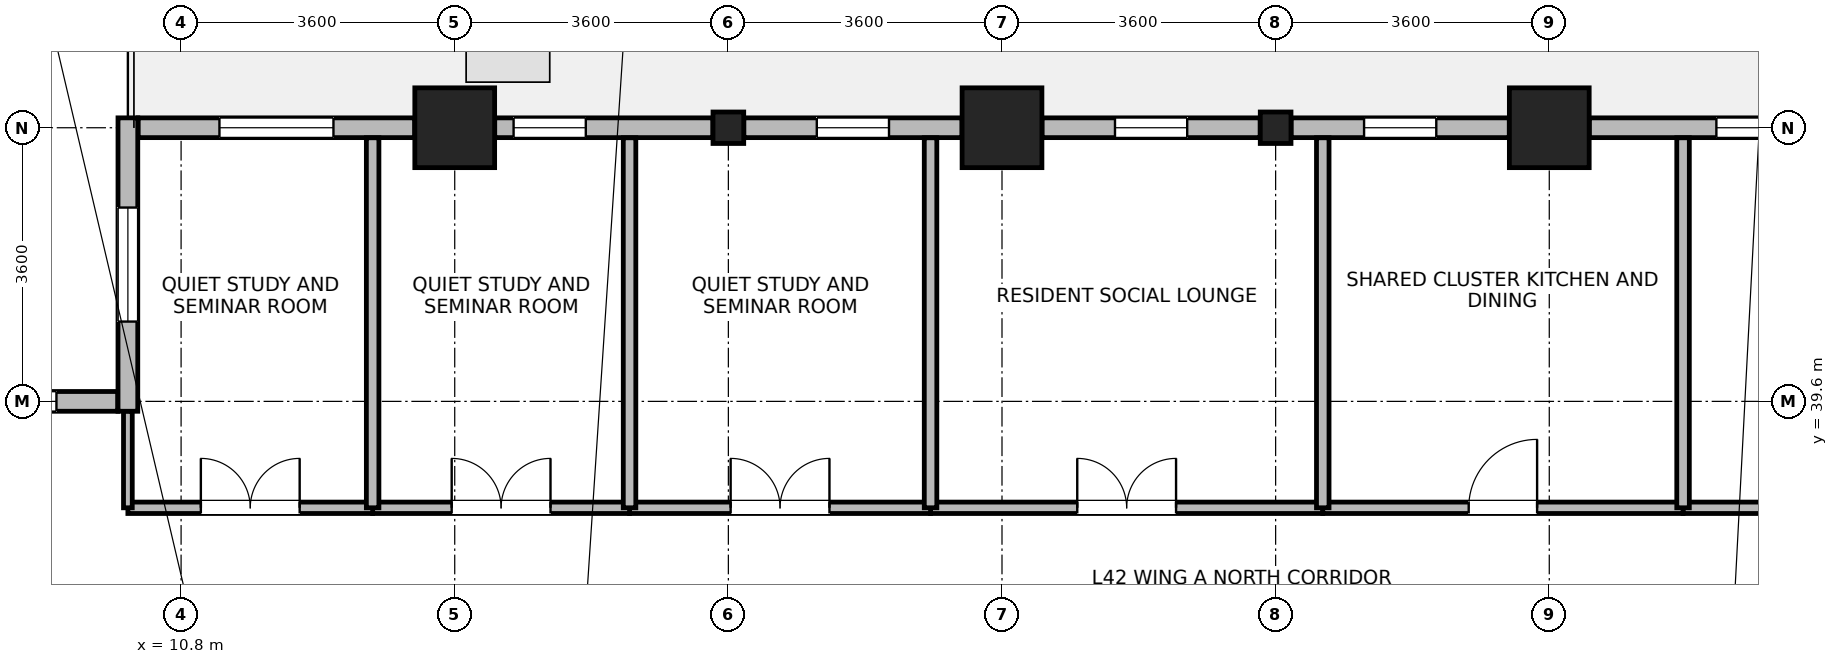
"""IFC4 building model, lengths in metres.
Left out: names, types, materials, properties, quantities, classifications, styles, units other than length and angle.
Written with IfcOpenShell. Run it as: python <this file> out.ifc"""

import sys

from ifc_helpers import new_model, si_unit, direction, frame, frame_2d, origin, origin_2d, place, context, subcontext, project, spatial, rectangle, i_section, extrude, source, transform, mapped, element, fill, save


model = new_model("IFC4")
c1 = context("Model", 3, precision=1e-05, world=origin(), true_north=direction((0.0, 1.0)))
c2 = subcontext(c1, "Body", "Model", "MODEL_VIEW")
j1 = project(units=[si_unit("LENGTHUNIT", "METRE"), si_unit("PLANEANGLEUNIT", "RADIAN")], contexts=[c1])
p1 = place(None, origin())
s1 = spatial("IfcSite", under=j1, at=p1, CompositionType="ELEMENT")
p2 = place(p1, origin())
s2 = spatial("IfcBuilding", under=s1, at=p2, CompositionType="ELEMENT")
p3 = place(p2, frame((0.0, 0.0, 166.1)))
s3 = spatial("IfcBuildingStorey", under=s2, at=p3, CompositionType="ELEMENT", Elevation=166.1)
m1 = source(origin(), c2, "Body", "SweptSolid", [
    extrude(rectangle(XDim=1.05, YDim=1.05, at=origin_2d()), origin(), (0.0, 0.0, 1.0), 3.7),
])
for number, where, z_axis, x_axis in (
    (1, (14.4, 43.2, 0.0), (0.0, 0.0, 1.0), (1.0, 0.0, 0.0)),
    (2, (21.6, 43.2, 0.0), (0.0, 0.0, 1.0), (1.0, 0.0, 0.0)),
    (3, (28.8, 43.2, 0.0), (0.0, 0.0, 1.0), (1.0, 0.0, 0.0)),
):
    element("IfcColumn", number, at=place(p3, frame(where, z_axis=z_axis, x_axis=x_axis)), inside=s3, PredefinedType="COLUMN", context=c2, shape_type="MappedRepresentation", body=[
        mapped(m1, transform((0.0, 0.0, 0.0), x_axis=(1.0, 0.0, 0.0), y_axis=(0.0, 1.0, 0.0), z_axis=(0.0, 0.0, 1.0), scale=1.0)),
    ])
m2 = source(origin(), c2, "Body", "SweptSolid", [
    extrude(i_section(OverallWidth=0.404, OverallDepth=0.414, WebThickness=0.021, FlangeThickness=0.028, FilletRadius=0.015, at=origin_2d()), origin(), (0.0, 0.0, 1.0), 3.7),
])
for number, where, z_axis, x_axis in (
    (4, (18.0, 43.2, 0.0), (0.0, 0.0, 1.0), (1.0, 0.0, 0.0)),
    (5, (25.2, 43.2, 0.0), (0.0, 0.0, 1.0), (1.0, 0.0, 0.0)),
):
    element("IfcColumn", number, at=place(p3, frame(where, z_axis=z_axis, x_axis=x_axis)), inside=s3, PredefinedType="COLUMN", context=c2, shape_type="MappedRepresentation", body=[
        mapped(m2, transform((0.0, 0.0, 0.0), x_axis=(1.0, 0.0, 0.0), y_axis=(0.0, 1.0, 0.0), z_axis=(0.0, 0.0, 1.0), scale=1.0)),
    ])
p4 = place(p3, frame((29.326, 43.2, 0.0), z_axis=(0.0, 0.0, 1.0), x_axis=(1.0, 0.0, 0.0)))
e6 = element("IfcWall", 6, at=p4, inside=s3, PredefinedType="STANDARD", context=c2, shape_type="SweptSolid", body=[
    extrude(rectangle(XDim=2.871, YDim=0.26, at=frame_2d((1.436, 0.0))), origin(), (0.0, 0.0, 1.0), 2.99),
])
p5 = place(p4, frame((1.673, 0.0, 0.85)))
e7 = element("IfcOpeningElement", 7, at=p5, cuts=e6, PredefinedType="OPENING", context=c2, shape_type="SweptSolid", body=[
    extrude(rectangle(XDim=0.95, YDim=1.75, at=frame_2d((0.475, 0.875))), frame((0.0, 0.14, 0.0), z_axis=(0.0, -1.0, 0.0), x_axis=(1.0, 0.0, 0.0)), (0.0, 0.0, 1.0), 0.28),
])
p6 = place(p3, frame((25.403, 43.2, 0.0), z_axis=(0.0, 0.0, 1.0), x_axis=(1.0, 0.0, 0.0)))
e8 = element("IfcWall", 8, at=p6, inside=s3, PredefinedType="STANDARD", context=c2, shape_type="SweptSolid", body=[
    extrude(rectangle(XDim=2.871, YDim=0.26, at=frame_2d((1.436, 0.0))), origin(), (0.0, 0.0, 1.0), 2.99),
])
p7 = place(p6, frame((0.96, 0.0, 0.85)))
e9 = element("IfcOpeningElement", 9, at=p7, cuts=e8, PredefinedType="OPENING", context=c2, shape_type="SweptSolid", body=[
    extrude(rectangle(XDim=0.95, YDim=1.75, at=frame_2d((0.475, 0.875))), frame((0.0, 0.14, 0.0), z_axis=(0.0, -1.0, 0.0), x_axis=(1.0, 0.0, 0.0)), (0.0, 0.0, 1.0), 0.28),
])
p8 = place(p3, frame((22.126, 43.2, 0.0), z_axis=(0.0, 0.0, 1.0), x_axis=(1.0, 0.0, 0.0)))
e10 = element("IfcWall", 10, at=p8, inside=s3, PredefinedType="STANDARD", context=c2, shape_type="SweptSolid", body=[
    extrude(rectangle(XDim=2.871, YDim=0.26, at=frame_2d((1.436, 0.0))), origin(), (0.0, 0.0, 1.0), 2.99),
])
p9 = place(p8, frame((0.96, 0.0, 0.85)))
e11 = element("IfcOpeningElement", 11, at=p9, cuts=e10, PredefinedType="OPENING", context=c2, shape_type="SweptSolid", body=[
    extrude(rectangle(XDim=0.95, YDim=1.75, at=frame_2d((0.475, 0.875))), frame((0.0, 0.14, 0.0), z_axis=(0.0, -1.0, 0.0), x_axis=(1.0, 0.0, 0.0)), (0.0, 0.0, 1.0), 0.28),
])
p10 = place(p3, frame((18.203, 43.2, 0.0), z_axis=(0.0, 0.0, 1.0), x_axis=(1.0, 0.0, 0.0)))
e12 = element("IfcWall", 12, at=p10, inside=s3, PredefinedType="STANDARD", context=c2, shape_type="SweptSolid", body=[
    extrude(rectangle(XDim=2.871, YDim=0.26, at=frame_2d((1.436, 0.0))), origin(), (0.0, 0.0, 1.0), 2.99),
])
p11 = place(p10, frame((0.96, 0.0, 0.85)))
e13 = element("IfcOpeningElement", 13, at=p11, cuts=e12, PredefinedType="OPENING", context=c2, shape_type="SweptSolid", body=[
    extrude(rectangle(XDim=0.95, YDim=1.75, at=frame_2d((0.475, 0.875))), frame((0.0, 0.14, 0.0), z_axis=(0.0, -1.0, 0.0), x_axis=(1.0, 0.0, 0.0)), (0.0, 0.0, 1.0), 0.28),
])
p12 = place(p3, frame((14.926, 43.2, 0.0), z_axis=(0.0, 0.0, 1.0), x_axis=(1.0, 0.0, 0.0)))
e14 = element("IfcWall", 14, at=p12, inside=s3, PredefinedType="STANDARD", context=c2, shape_type="SweptSolid", body=[
    extrude(rectangle(XDim=2.871, YDim=0.26, at=frame_2d((1.436, 0.0))), origin(), (0.0, 0.0, 1.0), 2.99),
])
p13 = place(p12, frame((0.249, 0.0, 0.85)))
e15 = element("IfcOpeningElement", 15, at=p13, cuts=e14, PredefinedType="OPENING", context=c2, shape_type="SweptSolid", body=[
    extrude(rectangle(XDim=0.95, YDim=1.75, at=frame_2d((0.475, 0.875))), frame((0.0, 0.14, 0.0), z_axis=(0.0, -1.0, 0.0), x_axis=(1.0, 0.0, 0.0)), (0.0, 0.0, 1.0), 0.28),
])
p14 = place(p3, frame((10.235, 43.2, 0.0), z_axis=(0.0, 0.0, 1.0), x_axis=(1.0, 0.0, 0.0)))
e16 = element("IfcWall", 16, at=p14, inside=s3, PredefinedType="STANDARD", context=c2, shape_type="SweptSolid", body=[
    extrude(rectangle(XDim=3.639, YDim=0.26, at=frame_2d((1.819, 0.0))), origin(), (0.0, 0.0, 1.0), 3.44),
])
p15 = place(p14, frame((1.07, 0.0, 0.85)))
e17 = element("IfcOpeningElement", 17, at=p15, cuts=e16, PredefinedType="OPENING", context=c2, shape_type="SweptSolid", body=[
    extrude(rectangle(XDim=1.5, YDim=1.85, at=frame_2d((0.75, 0.925))), frame((0.0, 0.14, 0.0), z_axis=(0.0, -1.0, 0.0), x_axis=(1.0, 0.0, 0.0)), (0.0, 0.0, 1.0), 0.28),
])
p16 = place(p3, frame((10.1, 39.47, 0.0), z_axis=(0.0, 0.0, 1.0), x_axis=(0.0, 1.0, 0.0)))
e18 = element("IfcWall", 18, at=p16, inside=s3, PredefinedType="STANDARD", context=c2, shape_type="SweptSolid", body=[
    extrude(rectangle(XDim=3.86, YDim=0.26, at=frame_2d((1.93, 0.0))), origin(), (0.0, 0.0, 1.0), 3.44),
])
p17 = place(p16, frame((1.18, 0.0, 0.85)))
e19 = element("IfcOpeningElement", 19, at=p17, cuts=e18, PredefinedType="OPENING", context=c2, shape_type="SweptSolid", body=[
    extrude(rectangle(XDim=1.5, YDim=1.85, at=frame_2d((0.75, 0.925))), frame((0.0, 0.14, 0.0), z_axis=(0.0, -1.0, 0.0), x_axis=(1.0, 0.0, 0.0)), (0.0, 0.0, 1.0), 0.28),
])
p18 = place(p3, frame((0.635, 39.6, 0.0), z_axis=(0.0, 0.0, 1.0), x_axis=(1.0, 0.0, 0.0)))
e20 = element("IfcWall", 20, at=p18, inside=s3, PredefinedType="STANDARD", context=c2, shape_type="SweptSolid", body=[
    extrude(rectangle(XDim=9.33, YDim=0.26, at=frame_2d((4.665, 0.0))), origin(), (0.0, 0.0, 1.0), 3.44),
])
p19 = place(p18, frame((0.805, 0.0, 0.85)))
e21 = element("IfcOpeningElement", 21, at=p19, cuts=e20, PredefinedType="OPENING", context=c2, shape_type="SweptSolid", body=[
    extrude(rectangle(XDim=1.5, YDim=1.85, at=frame_2d((0.75, 0.925))), frame((0.0, 0.14, 0.0), z_axis=(0.0, -1.0, 0.0), x_axis=(1.0, 0.0, 0.0)), (0.0, 0.0, 1.0), 0.28),
])
p20 = place(p18, frame((3.915, 0.0, 0.85)))
e22 = element("IfcOpeningElement", 22, at=p20, cuts=e20, PredefinedType="OPENING", context=c2, shape_type="SweptSolid", body=[
    extrude(rectangle(XDim=1.5, YDim=1.85, at=frame_2d((0.75, 0.925))), frame((0.0, 0.14, 0.0), z_axis=(0.0, -1.0, 0.0), x_axis=(1.0, 0.0, 0.0)), (0.0, 0.0, 1.0), 0.28),
])
p21 = place(p18, frame((7.025, 0.0, 0.85)))
e23 = element("IfcOpeningElement", 23, at=p21, cuts=e20, PredefinedType="OPENING", context=c2, shape_type="SweptSolid", body=[
    extrude(rectangle(XDim=1.5, YDim=1.85, at=frame_2d((0.75, 0.925))), frame((0.0, 0.14, 0.0), z_axis=(0.0, -1.0, 0.0), x_axis=(1.0, 0.0, 0.0)), (0.0, 0.0, 1.0), 0.28),
])
p22 = place(p3, frame((20.66, 38.2, 0.0), z_axis=(0.0, 0.0, 1.0), x_axis=(1.0, 0.0, 0.0)))
e24 = element("IfcWall", 24, at=p22, inside=s3, PredefinedType="PARTITIONING", context=c2, shape_type="SweptSolid", body=[
    extrude(rectangle(XDim=5.16, YDim=0.15, at=frame_2d((2.58, 0.0))), origin(), (0.0, 0.0, 1.0), 3.44),
])
p23 = place(p22, frame((1.93, 0.0, 0.0)))
e25 = element("IfcOpeningElement", 25, at=p23, cuts=e24, PredefinedType="OPENING", context=c2, shape_type="SweptSolid", body=[
    extrude(rectangle(XDim=1.3, YDim=2.12, at=frame_2d((0.65, 1.06))), frame((0.0, 0.085, 0.0), z_axis=(0.0, -1.0, 0.0), x_axis=(1.0, 0.0, 0.0)), (0.0, 0.0, 1.0), 0.17),
])
p24 = place(p3, frame((30.56, 38.2, 0.0), z_axis=(0.0, 0.0, 1.0), x_axis=(1.0, 0.0, 0.0)))
e26 = element("IfcWall", 26, at=p24, inside=s3, PredefinedType="PARTITIONING", context=c2, shape_type="SweptSolid", body=[
    extrude(rectangle(XDim=4.8, YDim=0.15, at=frame_2d((2.4, 0.0))), origin(), (0.0, 0.0, 1.0), 3.44),
])
p25 = place(p24, frame((1.75, 0.0, 0.0)))
e27 = element("IfcOpeningElement", 27, at=p25, cuts=e26, PredefinedType="OPENING", context=c2, shape_type="SweptSolid", body=[
    extrude(rectangle(XDim=1.3, YDim=2.12, at=frame_2d((0.65, 1.06))), frame((0.0, 0.085, 0.0), z_axis=(0.0, -1.0, 0.0), x_axis=(1.0, 0.0, 0.0)), (0.0, 0.0, 1.0), 0.17),
])
p26 = place(p3, frame((25.82, 38.2, 0.0), z_axis=(0.0, 0.0, 1.0), x_axis=(1.0, 0.0, 0.0)))
e28 = element("IfcWall", 28, at=p26, inside=s3, PredefinedType="PARTITIONING", context=c2, shape_type="SweptSolid", body=[
    extrude(rectangle(XDim=4.74, YDim=0.15, at=frame_2d((2.37, 0.0))), origin(), (0.0, 0.0, 1.0), 3.44),
])
p27 = place(p26, frame((1.92, 0.0, 0.0)))
e29 = element("IfcOpeningElement", 29, at=p27, cuts=e28, PredefinedType="OPENING", context=c2, shape_type="SweptSolid", body=[
    extrude(rectangle(XDim=0.9, YDim=2.08, at=frame_2d((0.45, 1.04))), frame((0.0, 0.085, 0.0), z_axis=(0.0, -1.0, 0.0), x_axis=(1.0, 0.0, 0.0)), (0.0, 0.0, 1.0), 0.17),
])
p28 = place(p3, frame((16.7, 38.2, 0.0), z_axis=(0.0, 0.0, 1.0), x_axis=(1.0, 0.0, 0.0)))
e30 = element("IfcWall", 30, at=p28, inside=s3, PredefinedType="PARTITIONING", context=c2, shape_type="SweptSolid", body=[
    extrude(rectangle(XDim=3.96, YDim=0.15, at=frame_2d((1.98, 0.0))), origin(), (0.0, 0.0, 1.0), 3.44),
])
p29 = place(p28, frame((1.33, 0.0, 0.0)))
e31 = element("IfcOpeningElement", 31, at=p29, cuts=e30, PredefinedType="OPENING", context=c2, shape_type="SweptSolid", body=[
    extrude(rectangle(XDim=1.3, YDim=2.12, at=frame_2d((0.65, 1.06))), frame((0.0, 0.085, 0.0), z_axis=(0.0, -1.0, 0.0), x_axis=(1.0, 0.0, 0.0)), (0.0, 0.0, 1.0), 0.17),
])
p30 = place(p3, frame((13.32, 38.2, 0.0), z_axis=(0.0, 0.0, 1.0), x_axis=(1.0, 0.0, 0.0)))
e32 = element("IfcWall", 32, at=p30, inside=s3, PredefinedType="PARTITIONING", context=c2, shape_type="SweptSolid", body=[
    extrude(rectangle(XDim=3.38, YDim=0.15, at=frame_2d((1.69, 0.0))), origin(), (0.0, 0.0, 1.0), 3.44),
])
p31 = place(p30, frame((1.04, 0.0, 0.0)))
e33 = element("IfcOpeningElement", 33, at=p31, cuts=e32, PredefinedType="OPENING", context=c2, shape_type="SweptSolid", body=[
    extrude(rectangle(XDim=1.3, YDim=2.12, at=frame_2d((0.65, 1.06))), frame((0.0, 0.085, 0.0), z_axis=(0.0, -1.0, 0.0), x_axis=(1.0, 0.0, 0.0)), (0.0, 0.0, 1.0), 0.17),
])
p32 = place(p3, frame((10.1, 38.2, 0.0), z_axis=(0.0, 0.0, 1.0), x_axis=(1.0, 0.0, 0.0)))
e34 = element("IfcWall", 34, at=p32, inside=s3, PredefinedType="PARTITIONING", context=c2, shape_type="SweptSolid", body=[
    extrude(rectangle(XDim=3.22, YDim=0.15, at=frame_2d((1.61, 0.0))), origin(), (0.0, 0.0, 1.0), 3.44),
])
p33 = place(p32, frame((0.96, 0.0, 0.0)))
e35 = element("IfcOpeningElement", 35, at=p33, cuts=e34, PredefinedType="OPENING", context=c2, shape_type="SweptSolid", body=[
    extrude(rectangle(XDim=1.3, YDim=2.12, at=frame_2d((0.65, 1.06))), frame((0.0, 0.085, 0.0), z_axis=(0.0, -1.0, 0.0), x_axis=(1.0, 0.0, 0.0)), (0.0, 0.0, 1.0), 0.17),
])
p34 = place(p3, frame((10.1, 38.2, 0.0), z_axis=(0.0, 0.0, 1.0), x_axis=(0.0, 1.0, 0.0)))
e36 = element("IfcWall", 36, at=p34, inside=s3, PredefinedType="PARTITIONING", context=c2, shape_type="SweptSolid", body=[
    extrude(rectangle(XDim=1.268, YDim=0.115, at=frame_2d((0.634, 0.0))), origin(), (0.0, 0.0, 1.0), 3.44),
])
for number, where, z_axis, x_axis in (
    (37, (13.32, 38.2, 0.0), (0.0, 0.0, 1.0), (0.0, 1.0, 0.0)),
    (38, (16.7, 38.2, 0.0), (0.0, 0.0, 1.0), (0.0, 1.0, 0.0)),
    (39, (20.66, 38.2, 0.0), (0.0, 0.0, 1.0), (0.0, 1.0, 0.0)),
    (40, (25.82, 38.2, 0.0), (0.0, 0.0, 1.0), (0.0, 1.0, 0.0)),
    (41, (30.56, 38.2, 0.0), (0.0, 0.0, 1.0), (0.0, 1.0, 0.0)),
):
    element("IfcWall", number, at=place(p3, frame(where, z_axis=z_axis, x_axis=x_axis)), inside=s3, PredefinedType="PARTITIONING", context=c2, shape_type="SweptSolid", body=[
        extrude(rectangle(XDim=4.868, YDim=0.165, at=frame_2d((2.434, 0.0))), origin(), (0.0, 0.0, 1.0), 3.44),
    ])
p35 = place(p5, origin())
e42 = element("IfcWindow", 42, at=p35, inside=s3, PartitioningType="SINGLE_PANEL", PredefinedType="WINDOW", context=c2, shape_type="SweptSolid", body=[
    extrude(rectangle(XDim=0.95, YDim=1.75, at=frame_2d((0.475, 0.875))), frame((0.0, 0.03, 0.0), z_axis=(0.0, -1.0, 0.0), x_axis=(1.0, 0.0, 0.0)), (0.0, 0.0, 1.0), 0.06),
])
fill(e7, e42)
p36 = place(p7, origin())
e43 = element("IfcWindow", 43, at=p36, inside=s3, PartitioningType="SINGLE_PANEL", PredefinedType="WINDOW", context=c2, shape_type="SweptSolid", body=[
    extrude(rectangle(XDim=0.95, YDim=1.75, at=frame_2d((0.475, 0.875))), frame((0.0, 0.03, 0.0), z_axis=(0.0, -1.0, 0.0), x_axis=(1.0, 0.0, 0.0)), (0.0, 0.0, 1.0), 0.06),
])
fill(e9, e43)
p37 = place(p9, origin())
e44 = element("IfcWindow", 44, at=p37, inside=s3, PartitioningType="SINGLE_PANEL", PredefinedType="WINDOW", context=c2, shape_type="SweptSolid", body=[
    extrude(rectangle(XDim=0.95, YDim=1.75, at=frame_2d((0.475, 0.875))), frame((0.0, 0.03, 0.0), z_axis=(0.0, -1.0, 0.0), x_axis=(1.0, 0.0, 0.0)), (0.0, 0.0, 1.0), 0.06),
])
fill(e11, e44)
p38 = place(p11, origin())
e45 = element("IfcWindow", 45, at=p38, inside=s3, PartitioningType="SINGLE_PANEL", PredefinedType="WINDOW", context=c2, shape_type="SweptSolid", body=[
    extrude(rectangle(XDim=0.95, YDim=1.75, at=frame_2d((0.475, 0.875))), frame((0.0, 0.03, 0.0), z_axis=(0.0, -1.0, 0.0), x_axis=(1.0, 0.0, 0.0)), (0.0, 0.0, 1.0), 0.06),
])
fill(e13, e45)
p39 = place(p13, origin())
e46 = element("IfcWindow", 46, at=p39, inside=s3, PartitioningType="SINGLE_PANEL", PredefinedType="WINDOW", context=c2, shape_type="SweptSolid", body=[
    extrude(rectangle(XDim=0.95, YDim=1.75, at=frame_2d((0.475, 0.875))), frame((0.0, 0.03, 0.0), z_axis=(0.0, -1.0, 0.0), x_axis=(1.0, 0.0, 0.0)), (0.0, 0.0, 1.0), 0.06),
])
fill(e15, e46)
p40 = place(p15, origin())
e47 = element("IfcWindow", 47, at=p40, inside=s3, PartitioningType="SINGLE_PANEL", PredefinedType="WINDOW", context=c2, shape_type="SweptSolid", body=[
    extrude(rectangle(XDim=1.5, YDim=1.85, at=frame_2d((0.75, 0.925))), frame((0.0, 0.03, 0.0), z_axis=(0.0, -1.0, 0.0), x_axis=(1.0, 0.0, 0.0)), (0.0, 0.0, 1.0), 0.06),
])
fill(e17, e47)
p41 = place(p17, origin())
e48 = element("IfcWindow", 48, at=p41, inside=s3, PartitioningType="SINGLE_PANEL", PredefinedType="WINDOW", context=c2, shape_type="SweptSolid", body=[
    extrude(rectangle(XDim=1.5, YDim=1.85, at=frame_2d((0.75, 0.925))), frame((0.0, 0.03, 0.0), z_axis=(0.0, -1.0, 0.0), x_axis=(1.0, 0.0, 0.0)), (0.0, 0.0, 1.0), 0.06),
])
fill(e19, e48)
p42 = place(p21, origin())
e49 = element("IfcWindow", 49, at=p42, inside=s3, PartitioningType="SINGLE_PANEL", PredefinedType="WINDOW", context=c2, shape_type="SweptSolid", body=[
    extrude(rectangle(XDim=1.5, YDim=1.85, at=frame_2d((0.75, 0.925))), frame((0.0, 0.03, 0.0), z_axis=(0.0, -1.0, 0.0), x_axis=(1.0, 0.0, 0.0)), (0.0, 0.0, 1.0), 0.06),
])
fill(e23, e49)
p43 = place(p23, origin())
e50 = element("IfcDoor", 50, at=p43, inside=s3, OperationType="DOUBLE_DOOR_SINGLE_SWING", PredefinedType="DOOR", context=c2, shape_type="SweptSolid", body=[
    extrude(rectangle(XDim=1.3, YDim=2.12, at=frame_2d((0.65, 1.06))), frame((0.0, 0.025, 0.0), z_axis=(0.0, -1.0, 0.0), x_axis=(1.0, 0.0, 0.0)), (0.0, 0.0, 1.0), 0.05),
])
fill(e25, e50)
p44 = place(p27, origin())
e51 = element("IfcDoor", 51, at=p44, inside=s3, OperationType="SINGLE_SWING_RIGHT", PredefinedType="DOOR", context=c2, shape_type="SweptSolid", body=[
    extrude(rectangle(XDim=0.9, YDim=2.08, at=frame_2d((0.45, 1.04))), frame((0.0, 0.025, 0.0), z_axis=(0.0, -1.0, 0.0), x_axis=(1.0, 0.0, 0.0)), (0.0, 0.0, 1.0), 0.05),
])
fill(e29, e51)
p45 = place(p29, origin())
e52 = element("IfcDoor", 52, at=p45, inside=s3, OperationType="DOUBLE_DOOR_SINGLE_SWING", PredefinedType="DOOR", context=c2, shape_type="SweptSolid", body=[
    extrude(rectangle(XDim=1.3, YDim=2.12, at=frame_2d((0.65, 1.06))), frame((0.0, 0.025, 0.0), z_axis=(0.0, -1.0, 0.0), x_axis=(1.0, 0.0, 0.0)), (0.0, 0.0, 1.0), 0.05),
])
fill(e31, e52)
p46 = place(p31, origin())
e53 = element("IfcDoor", 53, at=p46, inside=s3, OperationType="DOUBLE_DOOR_SINGLE_SWING", PredefinedType="DOOR", context=c2, shape_type="SweptSolid", body=[
    extrude(rectangle(XDim=1.3, YDim=2.12, at=frame_2d((0.65, 1.06))), frame((0.0, 0.025, 0.0), z_axis=(0.0, -1.0, 0.0), x_axis=(1.0, 0.0, 0.0)), (0.0, 0.0, 1.0), 0.05),
])
fill(e33, e53)
p47 = place(p33, origin())
e54 = element("IfcDoor", 54, at=p47, inside=s3, OperationType="DOUBLE_DOOR_SINGLE_SWING", PredefinedType="DOOR", context=c2, shape_type="SweptSolid", body=[
    extrude(rectangle(XDim=1.3, YDim=2.12, at=frame_2d((0.65, 1.06))), frame((0.0, 0.025, 0.0), z_axis=(0.0, -1.0, 0.0), x_axis=(1.0, 0.0, 0.0)), (0.0, 0.0, 1.0), 0.05),
])
fill(e35, e54)
save(model, sys.argv[1])
